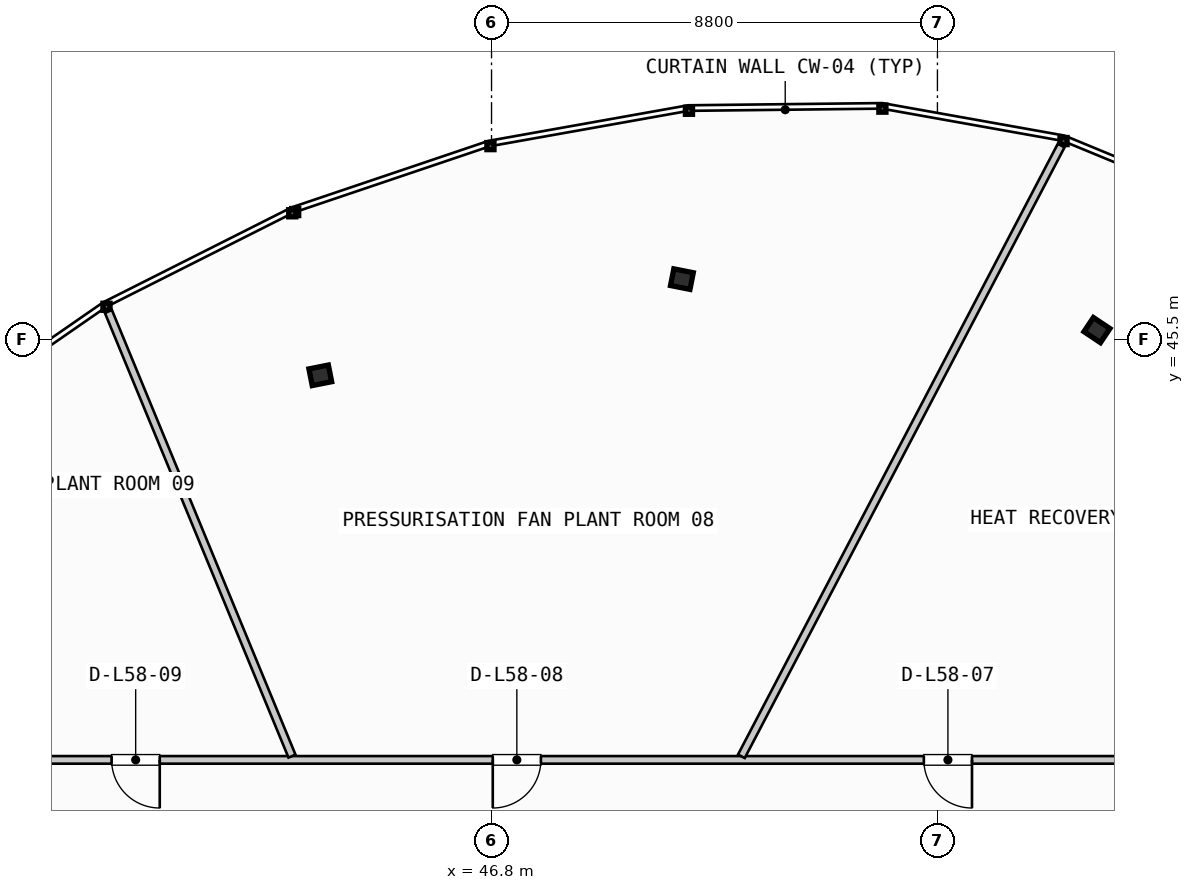
"""IFC4 building model, lengths in metres.
Left out: names, types, materials, properties, quantities, classifications, styles, units other than length and angle.
Written with IfcOpenShell. Run it as: python <this file> out.ifc"""

import sys

from ifc_helpers import new_model, si_unit, direction, frame, frame_2d, origin, origin_2d, place, context, subcontext, project, spatial, rectangle, i_section, extrude, source, transform, mapped, element, fill, save


model = new_model("IFC4")
c1 = context("Model", 3, precision=1e-05, world=origin(), true_north=direction((0.0, 1.0)))
c2 = subcontext(c1, "Body", "Model", "MODEL_VIEW")
j1 = project(units=[si_unit("LENGTHUNIT", "METRE"), si_unit("PLANEANGLEUNIT", "RADIAN")], contexts=[c1])
p1 = place(None, origin())
s1 = spatial("IfcSite", under=j1, at=p1, CompositionType="ELEMENT")
p2 = place(p1, origin())
s2 = spatial("IfcBuilding", under=s1, at=p2, CompositionType="ELEMENT")
p3 = place(p2, frame((0.0, 0.0, 223.6)))
s3 = spatial("IfcBuildingStorey", under=s2, at=p3, CompositionType="ELEMENT", Elevation=223.6)
m1 = source(origin(), c2, "Body", "SweptSolid", [
    extrude(i_section(OverallWidth=0.391, OverallDepth=0.335, WebThickness=0.023, FlangeThickness=0.034, FilletRadius=0.015, at=origin_2d()), origin(), (0.0, 0.0, 1.0), 4.38),
])
for number, where, z_axis, x_axis in (
    (1, (58.748, 45.681, 0.0), (0.0, 0.0, 1.0), (0.556, 0.831, 0.0)),
    (2, (50.557, 46.688, 0.0), (0.0, 0.0, 1.0), (0.195, 0.981, 0.0)),
    (3, (43.421, 44.789, 0.0), (0.0, 0.0, 1.0), (-0.195, 0.981, 0.0)),
):
    element("IfcColumn", number, at=place(p3, frame(where, z_axis=z_axis, x_axis=x_axis)), inside=s3, PredefinedType="COLUMN", context=c2, shape_type="MappedRepresentation", body=[
        mapped(m1, transform((0.0, 0.0, 0.0), scale=1.0)),
    ])
p4 = place(p3, frame((60.5, 37.2, 0.0), z_axis=(0.0, 0.0, 1.0), x_axis=(-1.0, 0.0, 0.0)))
e4 = element("IfcWall", 4, at=p4, inside=s3, PredefinedType="PARTITIONING", context=c2, shape_type="SweptSolid", body=[
    extrude(rectangle(XDim=27.4, YDim=0.15, at=frame_2d((13.7, 0.0))), origin(), (0.0, 0.0, 1.0), 2.455),
])
p5 = place(p4, frame((4.218, 0.0, 0.0)))
e5 = element("IfcOpeningElement", 5, at=p5, cuts=e4, PredefinedType="OPENING", context=c2, shape_type="SweptSolid", body=[
    extrude(rectangle(XDim=0.95, YDim=2.15, at=frame_2d((0.475, 1.075))), frame((0.0, 0.085, 0.0), z_axis=(0.0, -1.0, 0.0), x_axis=(1.0, 0.0, 0.0)), (0.0, 0.0, 1.0), 0.17),
])
p6 = place(p4, frame((12.726, 0.0, 0.0)))
e6 = element("IfcOpeningElement", 6, at=p6, cuts=e4, PredefinedType="OPENING", context=c2, shape_type="SweptSolid", body=[
    extrude(rectangle(XDim=0.95, YDim=2.15, at=frame_2d((0.475, 1.075))), frame((0.0, 0.085, 0.0), z_axis=(0.0, -1.0, 0.0), x_axis=(1.0, 0.0, 0.0)), (0.0, 0.0, 1.0), 0.17),
])
p7 = place(p4, frame((20.248, 0.0, 0.0)))
e7 = element("IfcOpeningElement", 7, at=p7, cuts=e4, PredefinedType="OPENING", context=c2, shape_type="SweptSolid", body=[
    extrude(rectangle(XDim=0.95, YDim=2.15, at=frame_2d((0.475, 1.075))), frame((0.0, 0.085, 0.0), z_axis=(0.0, -1.0, 0.0), x_axis=(1.0, 0.0, 0.0)), (0.0, 0.0, 1.0), 0.17),
])
p8 = place(p3, frame((51.731, 37.271, 0.0), z_axis=(0.0, 0.0, 1.0), x_axis=(0.46390305582, 0.885885971669, 0.0)))
e8 = element("IfcWall", 8, at=p8, inside=s3, PredefinedType="PARTITIONING", context=c2, shape_type="SweptSolid", body=[
    extrude(rectangle(XDim=13.605, YDim=0.15, at=frame_2d((6.802, 0.0))), origin(), (0.0, 0.0, 1.0), 2.455),
])
p9 = place(p3, frame((42.862, 37.274, 0.0), z_axis=(0.0, 0.0, 1.0), x_axis=(-0.381658905652, 0.924303240142, 0.0)))
e9 = element("IfcWall", 9, at=p9, inside=s3, PredefinedType="PARTITIONING", context=c2, shape_type="SweptSolid", body=[
    extrude(rectangle(XDim=9.494, YDim=0.15, at=frame_2d((4.747, 0.0))), origin(), (0.0, 0.0, 1.0), 2.455),
])
m2 = source(origin(), c2, "Body", "SweptSolid", [
    extrude(rectangle(XDim=0.95, YDim=2.15, at=frame_2d((0.475, 1.075))), frame((0.0, 0.025, 0.0), z_axis=(0.0, -1.0, 0.0), x_axis=(1.0, 0.0, 0.0)), (0.0, 0.0, 1.0), 0.05),
])
p10 = place(p5, origin())
e10 = element("IfcDoor", 10, at=p10, inside=s3, OperationType="SINGLE_SWING_LEFT", PredefinedType="DOOR", context=c2, shape_type="MappedRepresentation", body=[
    mapped(m2, transform((0.0, 0.0, 0.0), scale=1.0)),
])
fill(e5, e10)
p11 = place(p6, origin())
e11 = element("IfcDoor", 11, at=p11, inside=s3, OperationType="SINGLE_SWING_RIGHT", PredefinedType="DOOR", context=c2, shape_type="MappedRepresentation", body=[
    mapped(m2, transform((0.0, 0.0, 0.0), scale=1.0)),
])
fill(e6, e11)
p12 = place(p7, origin())
e12 = element("IfcDoor", 12, at=p12, inside=s3, OperationType="SINGLE_SWING_LEFT", PredefinedType="DOOR", context=c2, shape_type="MappedRepresentation", body=[
    mapped(m2, transform((0.0, 0.0, 0.0), scale=1.0)),
])
fill(e7, e12)
save(model, sys.argv[1])
